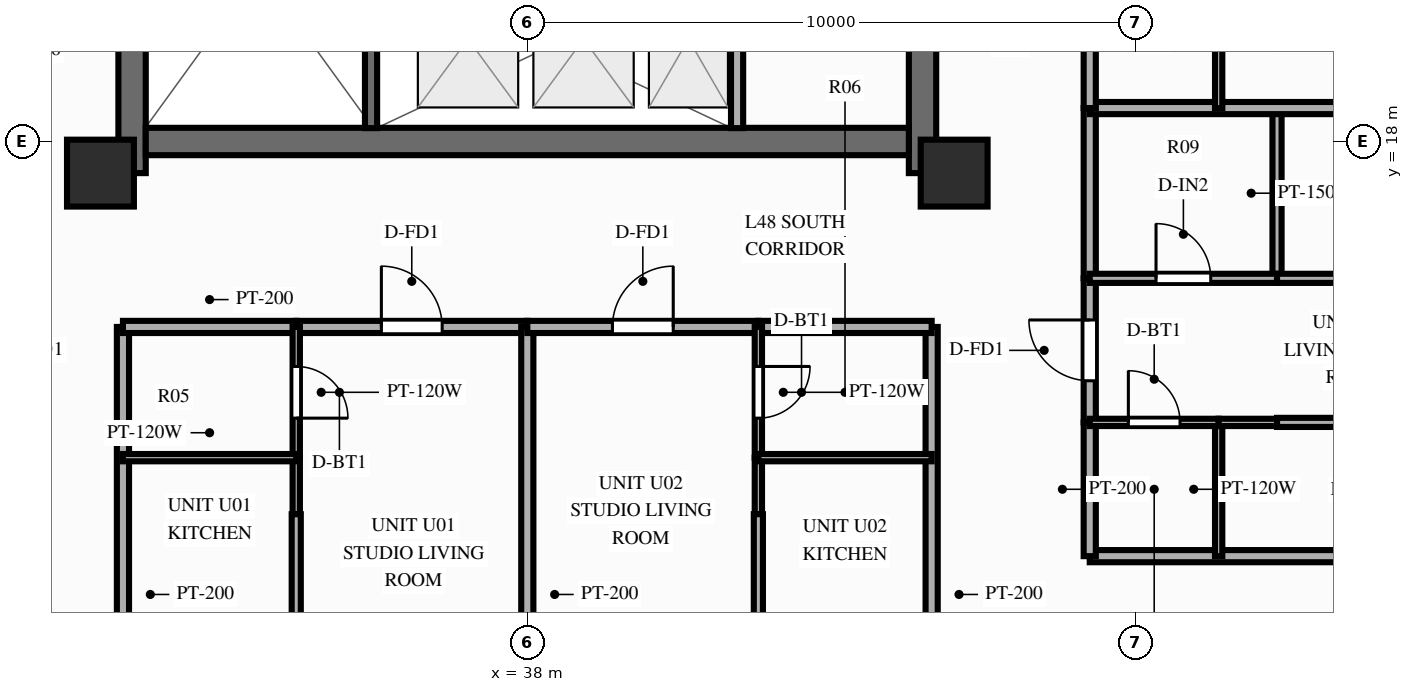
"""IFC4 building model, lengths in metres.
Left out: names, types, materials, properties, quantities, classifications, styles, units other than length and angle.
Written with IfcOpenShell. Run it as: python <this file> out.ifc"""

import sys

from ifc_helpers import new_model, si_unit, direction, frame, frame_2d, origin, origin_2d, place, context, subcontext, project, spatial, rectangle, extrude, source, transform, mapped, element, fill, save


model = new_model("IFC4")
c1 = context("Model", 3, precision=1e-05, world=origin(), true_north=direction((0.0, 1.0)))
c2 = subcontext(c1, "Body", "Model", "MODEL_VIEW")
j1 = project(units=[si_unit("LENGTHUNIT", "METRE"), si_unit("PLANEANGLEUNIT", "RADIAN")], contexts=[c1])
p1 = place(None, origin())
s1 = spatial("IfcSite", under=j1, at=p1, CompositionType="ELEMENT")
p2 = place(p1, origin())
s2 = spatial("IfcBuilding", under=s1, at=p2, CompositionType="ELEMENT")
p3 = place(p2, frame((0.0, 0.0, 152.2)))
s3 = spatial("IfcBuildingStorey", under=s2, at=p3, CompositionType="ELEMENT", Elevation=152.2)
p4 = place(p3, frame((31.5, 17.48, 0.0), z_axis=(0.0, 0.0, 1.0), x_axis=(0.0, 1.0, 0.0)))
e1 = element("IfcWall", 1, at=p4, inside=s3, PredefinedType="SHEAR", context=c2, shape_type="SweptSolid", body=[
    extrude(rectangle(XDim=19.04, YDim=0.45, at=frame_2d((9.52, 0.0))), origin(), (0.0, 0.0, 1.0), 3.9),
])
p5 = place(p4, frame((6.32, 0.0, 0.0)))
e2 = element("IfcOpeningElement", 2, at=p5, cuts=e1, PredefinedType="OPENING", context=c2, shape_type="SweptSolid", body=[
    extrude(rectangle(XDim=1.1, YDim=2.15, at=frame_2d((0.55, 1.075))), frame((0.0, 0.237, 0.0), z_axis=(0.0, -1.0, 0.0), x_axis=(1.0, 0.0, 0.0)), (0.0, 0.0, 1.0), 0.474),
])
p6 = place(p3, frame((44.5, 17.48, 0.0), z_axis=(0.0, 0.0, 1.0), x_axis=(0.0, 1.0, 0.0)))
e3 = element("IfcWall", 3, at=p6, inside=s3, PredefinedType="SHEAR", context=c2, shape_type="SweptSolid", body=[
    extrude(rectangle(XDim=19.04, YDim=0.45, at=frame_2d((9.52, 0.0))), origin(), (0.0, 0.0, 1.0), 3.9),
])
p7 = place(p6, frame((12.67, 0.0, 0.0), z_axis=(0.0, 0.0, 1.0), x_axis=(-1.0, 0.0, 0.0)))
e4 = element("IfcOpeningElement", 4, at=p7, cuts=e3, PredefinedType="OPENING", context=c2, shape_type="SweptSolid", body=[
    extrude(rectangle(XDim=1.1, YDim=2.15, at=frame_2d((0.55, 1.075))), frame((0.0, 0.237, 0.0), z_axis=(0.0, -1.0, 0.0), x_axis=(1.0, 0.0, 0.0)), (0.0, 0.0, 1.0), 0.474),
])
p8 = place(p3, frame((31.725, 18.0, 0.0), z_axis=(0.0, 0.0, 1.0), x_axis=(1.0, 0.0, 0.0)))
e5 = element("IfcWall", 5, at=p8, inside=s3, PredefinedType="SHEAR", context=c2, shape_type="SweptSolid", body=[
    extrude(rectangle(XDim=12.55, YDim=0.45, at=frame_2d((6.275, 0.0))), origin(), (0.0, 0.0, 1.0), 3.9),
])
m1 = source(origin(), c2, "Body", "SweptSolid", [
    extrude(rectangle(XDim=1.1, YDim=1.1, at=origin_2d()), origin(), (0.0, 0.0, 1.0), 3.9),
])
for number, where, z_axis, x_axis in (
    (6, (30.98, 17.48, 0.0), (0.0, 0.0, 1.0), (1.0, 0.0, 0.0)),
    (7, (45.02, 17.48, 0.0), (0.0, 0.0, 1.0), (1.0, 0.0, 0.0)),
):
    element("IfcColumn", number, at=place(p3, frame(where, z_axis=z_axis, x_axis=x_axis)), inside=s3, PredefinedType="COLUMN", context=c2, shape_type="MappedRepresentation", body=[
        mapped(m1, transform((0.0, 0.0, 0.0), scale=1.0)),
    ])
p9 = place(p3, frame((41.45, 18.22, 0.0), z_axis=(0.0, 0.0, 1.0), x_axis=(0.0, 1.0, 0.0)))
e8 = element("IfcWall", 8, at=p9, inside=s3, PredefinedType="PARTITIONING", context=c2, shape_type="SweptSolid", body=[
    extrude(rectangle(XDim=2.86, YDim=0.2, at=frame_2d((1.43, 0.0))), origin(), (0.0, 0.0, 1.0), 3.56),
])
p10 = place(p3, frame((35.43, 18.22, 0.0), z_axis=(0.0, 0.0, 1.0), x_axis=(0.0, 1.0, 0.0)))
e9 = element("IfcWall", 9, at=p10, inside=s3, PredefinedType="SOLIDWALL", context=c2, shape_type="SweptSolid", body=[
    extrude(rectangle(XDim=7.22, YDim=0.2, at=frame_2d((3.61, 0.0))), origin(), (0.0, 0.0, 1.0), 3.69),
])
p11 = place(p10, frame((6.68, 0.0, 0.0), z_axis=(0.0, 0.0, 1.0), x_axis=(-1.0, 0.0, 0.0)))
e10 = element("IfcOpeningElement", 10, at=p11, cuts=e9, PredefinedType="OPENING", context=c2, shape_type="SweptSolid", body=[
    extrude(rectangle(XDim=1.1, YDim=2.15, at=frame_2d((0.55, 1.075))), frame((0.0, 0.112, 0.0), z_axis=(0.0, -1.0, 0.0), x_axis=(1.0, 0.0, 0.0)), (0.0, 0.0, 1.0), 0.224),
])
for number, where, z_axis, x_axis in (
    (11, (31.35, 14.95, 0.0), (0.0, 0.0, 1.0), (0.0, -1.0, 0.0)),
    (12, (44.65, 14.95, 0.0), (0.0, 0.0, 1.0), (0.0, -1.0, 0.0)),
):
    element("IfcWall", number, at=place(p3, frame(where, z_axis=z_axis, x_axis=x_axis)), inside=s3, PredefinedType="PARTITIONING", context=c2, shape_type="SweptSolid", body=[
        extrude(rectangle(XDim=8.8, YDim=0.2, at=frame_2d((4.4, 0.0))), origin(), (0.0, 0.0, 1.0), 2.44),
    ])
p12 = place(p3, frame((31.35, 14.95, 0.0), z_axis=(0.0, 0.0, 1.0), x_axis=(1.0, 0.0, 0.0)))
e13 = element("IfcWall", 13, at=p12, inside=s3, PredefinedType="PARTITIONING", context=c2, shape_type="SweptSolid", body=[
    extrude(rectangle(XDim=2.85, YDim=0.2, at=frame_2d((1.425, 0.0))), origin(), (0.0, 0.0, 1.0), 3.56),
])
p13 = place(p3, frame((34.2, 14.95, 0.0), z_axis=(0.0, 0.0, 1.0), x_axis=(1.0, 0.0, 0.0)))
e14 = element("IfcWall", 14, at=p13, inside=s3, PredefinedType="PARTITIONING", context=c2, shape_type="SweptSolid", body=[
    extrude(rectangle(XDim=3.8, YDim=0.2, at=frame_2d((1.9, 0.0))), origin(), (0.0, 0.0, 1.0), 3.56),
])
p14 = place(p13, frame((1.4, 0.0, 0.0)))
e15 = element("IfcOpeningElement", 15, at=p14, cuts=e14, PredefinedType="OPENING", context=c2, shape_type="SweptSolid", body=[
    extrude(rectangle(XDim=1.0, YDim=2.15, at=frame_2d((0.5, 1.075))), frame((0.0, 0.112, 0.0), z_axis=(0.0, -1.0, 0.0), x_axis=(1.0, 0.0, 0.0)), (0.0, 0.0, 1.0), 0.224),
])
p15 = place(p3, frame((34.2, 14.95, 0.0), z_axis=(0.0, 0.0, 1.0), x_axis=(0.0, -1.0, 0.0)))
e16 = element("IfcWall", 16, at=p15, inside=s3, PredefinedType="PARTITIONING", context=c2, shape_type="SweptSolid", body=[
    extrude(rectangle(XDim=2.15, YDim=0.12, at=frame_2d((1.075, 0.0))), origin(), (0.0, 0.0, 1.0), 3.56),
])
p16 = place(p15, frame((0.65, 0.0, 0.0)))
e17 = element("IfcOpeningElement", 17, at=p16, cuts=e16, PredefinedType="OPENING", context=c2, shape_type="SweptSolid", body=[
    extrude(rectangle(XDim=0.85, YDim=2.05, at=frame_2d((0.425, 1.025))), frame((0.0, 0.072, 0.0), z_axis=(0.0, -1.0, 0.0), x_axis=(1.0, 0.0, 0.0)), (0.0, 0.0, 1.0), 0.144),
])
p17 = place(p3, frame((34.2, 12.8, 0.0), z_axis=(0.0, 0.0, 1.0), x_axis=(0.0, -1.0, 0.0)))
e18 = element("IfcWall", 18, at=p17, inside=s3, PredefinedType="PARTITIONING", context=c2, shape_type="SweptSolid", body=[
    extrude(rectangle(XDim=0.93, YDim=0.12, at=frame_2d((0.465, 0.0))), origin(), (0.0, 0.0, 1.0), 3.56),
])
p18 = place(p3, frame((31.35, 12.8, 0.0), z_axis=(0.0, 0.0, 1.0), x_axis=(1.0, 0.0, 0.0)))
e19 = element("IfcWall", 19, at=p18, inside=s3, PredefinedType="PARTITIONING", context=c2, shape_type="SweptSolid", body=[
    extrude(rectangle(XDim=2.85, YDim=0.12, at=frame_2d((1.425, 0.0))), origin(), (0.0, 0.0, 1.0), 3.56),
])
p19 = place(p3, frame((34.2, 11.87, 0.0), z_axis=(0.0, 0.0, 1.0), x_axis=(0.0, -1.0, 0.0)))
e20 = element("IfcWall", 20, at=p19, inside=s3, PredefinedType="PARTITIONING", context=c2, shape_type="SweptSolid", body=[
    extrude(rectangle(XDim=5.72, YDim=0.15, at=frame_2d((2.86, 0.0))), origin(), (0.0, 0.0, 1.0), 3.56),
])
p20 = place(p19, frame((2.229, 0.0, 0.0)))
e21 = element("IfcOpeningElement", 21, at=p20, cuts=e20, PredefinedType="OPENING", context=c2, shape_type="SweptSolid", body=[
    extrude(rectangle(XDim=0.9, YDim=2.1, at=frame_2d((0.45, 1.05))), frame((0.0, 0.087, 0.0), z_axis=(0.0, -1.0, 0.0), x_axis=(1.0, 0.0, 0.0)), (0.0, 0.0, 1.0), 0.174),
])
p21 = place(p3, frame((38.0, 14.95, 0.0), z_axis=(0.0, 0.0, 1.0), x_axis=(0.0, -1.0, 0.0)))
e22 = element("IfcWall", 22, at=p21, inside=s3, PredefinedType="PARTITIONING", context=c2, shape_type="SweptSolid", body=[
    extrude(rectangle(XDim=8.8, YDim=0.2, at=frame_2d((4.4, 0.0))), origin(), (0.0, 0.0, 1.0), 3.56),
])
p22 = place(p3, frame((38.0, 14.95, 0.0), z_axis=(0.0, 0.0, 1.0), x_axis=(1.0, 0.0, 0.0)))
e23 = element("IfcWall", 23, at=p22, inside=s3, PredefinedType="PARTITIONING", context=c2, shape_type="SweptSolid", body=[
    extrude(rectangle(XDim=3.8, YDim=0.2, at=frame_2d((1.9, 0.0))), origin(), (0.0, 0.0, 1.0), 3.56),
])
p23 = place(p22, frame((1.4, 0.0, 0.0)))
e24 = element("IfcOpeningElement", 24, at=p23, cuts=e23, PredefinedType="OPENING", context=c2, shape_type="SweptSolid", body=[
    extrude(rectangle(XDim=1.0, YDim=2.15, at=frame_2d((0.5, 1.075))), frame((0.0, 0.112, 0.0), z_axis=(0.0, -1.0, 0.0), x_axis=(1.0, 0.0, 0.0)), (0.0, 0.0, 1.0), 0.224),
])
p24 = place(p3, frame((41.8, 14.95, 0.0), z_axis=(0.0, 0.0, 1.0), x_axis=(1.0, 0.0, 0.0)))
e25 = element("IfcWall", 25, at=p24, inside=s3, PredefinedType="PARTITIONING", context=c2, shape_type="SweptSolid", body=[
    extrude(rectangle(XDim=2.85, YDim=0.2, at=frame_2d((1.425, 0.0))), origin(), (0.0, 0.0, 1.0), 3.56),
])
p25 = place(p3, frame((41.8, 14.95, 0.0), z_axis=(0.0, 0.0, 1.0), x_axis=(0.0, -1.0, 0.0)))
e26 = element("IfcWall", 26, at=p25, inside=s3, PredefinedType="PARTITIONING", context=c2, shape_type="SweptSolid", body=[
    extrude(rectangle(XDim=2.15, YDim=0.12, at=frame_2d((1.075, 0.0))), origin(), (0.0, 0.0, 1.0), 3.56),
])
p26 = place(p25, frame((0.65, 0.0, 0.0)))
e27 = element("IfcOpeningElement", 27, at=p26, cuts=e26, PredefinedType="OPENING", context=c2, shape_type="SweptSolid", body=[
    extrude(rectangle(XDim=0.85, YDim=2.05, at=frame_2d((0.425, 1.025))), frame((0.0, 0.072, 0.0), z_axis=(0.0, -1.0, 0.0), x_axis=(1.0, 0.0, 0.0)), (0.0, 0.0, 1.0), 0.144),
])
p27 = place(p3, frame((41.8, 12.8, 0.0), z_axis=(0.0, 0.0, 1.0), x_axis=(0.0, -1.0, 0.0)))
e28 = element("IfcWall", 28, at=p27, inside=s3, PredefinedType="PARTITIONING", context=c2, shape_type="SweptSolid", body=[
    extrude(rectangle(XDim=0.93, YDim=0.12, at=frame_2d((0.465, 0.0))), origin(), (0.0, 0.0, 1.0), 3.56),
])
p28 = place(p3, frame((41.8, 12.8, 0.0), z_axis=(0.0, 0.0, 1.0), x_axis=(1.0, 0.0, 0.0)))
e29 = element("IfcWall", 29, at=p28, inside=s3, PredefinedType="PARTITIONING", context=c2, shape_type="SweptSolid", body=[
    extrude(rectangle(XDim=2.85, YDim=0.12, at=frame_2d((1.425, 0.0))), origin(), (0.0, 0.0, 1.0), 3.56),
])
p29 = place(p3, frame((41.8, 11.87, 0.0), z_axis=(0.0, 0.0, 1.0), x_axis=(0.0, -1.0, 0.0)))
e30 = element("IfcWall", 30, at=p29, inside=s3, PredefinedType="PARTITIONING", context=c2, shape_type="SweptSolid", body=[
    extrude(rectangle(XDim=5.72, YDim=0.15, at=frame_2d((2.86, 0.0))), origin(), (0.0, 0.0, 1.0), 3.56),
])
p30 = place(p29, frame((2.229, 0.0, 0.0)))
e31 = element("IfcOpeningElement", 31, at=p30, cuts=e30, PredefinedType="OPENING", context=c2, shape_type="SweptSolid", body=[
    extrude(rectangle(XDim=0.9, YDim=2.1, at=frame_2d((0.45, 1.05))), frame((0.0, 0.087, 0.0), z_axis=(0.0, -1.0, 0.0), x_axis=(1.0, 0.0, 0.0)), (0.0, 0.0, 1.0), 0.174),
])
p31 = place(p3, frame((47.25, 11.18, 0.0), z_axis=(0.0, 0.0, 1.0), x_axis=(1.0, 0.0, 0.0)))
e32 = element("IfcWall", 32, at=p31, inside=s3, PredefinedType="PARTITIONING", context=c2, shape_type="SweptSolid", body=[
    extrude(rectangle(XDim=12.6, YDim=0.2, at=frame_2d((6.3, 0.0))), origin(), (0.0, 0.0, 1.0), 3.56),
])
p32 = place(p3, frame((47.25, 11.18, 0.0), z_axis=(0.0, 0.0, 1.0), x_axis=(0.0, 1.0, 0.0)))
e33 = element("IfcWall", 33, at=p32, inside=s3, PredefinedType="PARTITIONING", context=c2, shape_type="SweptSolid", body=[
    extrude(rectangle(XDim=2.2, YDim=0.2, at=frame_2d((1.1, 0.0))), origin(), (0.0, 0.0, 1.0), 3.56),
])
p33 = place(p3, frame((47.25, 13.38, 0.0), z_axis=(0.0, 0.0, 1.0), x_axis=(0.0, 1.0, 0.0)))
e34 = element("IfcWall", 34, at=p33, inside=s3, PredefinedType="PARTITIONING", context=c2, shape_type="SweptSolid", body=[
    extrude(rectangle(XDim=2.37, YDim=0.2, at=frame_2d((1.185, 0.0))), origin(), (0.0, 0.0, 1.0), 3.56),
])
p34 = place(p33, frame((0.685, 0.0, 0.0)))
e35 = element("IfcOpeningElement", 35, at=p34, cuts=e34, PredefinedType="OPENING", context=c2, shape_type="SweptSolid", body=[
    extrude(rectangle(XDim=1.0, YDim=2.15, at=frame_2d((0.5, 1.075))), frame((0.0, 0.112, 0.0), z_axis=(0.0, -1.0, 0.0), x_axis=(1.0, 0.0, 0.0)), (0.0, 0.0, 1.0), 0.224),
])
p35 = place(p3, frame((47.25, 15.75, 0.0), z_axis=(0.0, 0.0, 1.0), x_axis=(0.0, 1.0, 0.0)))
e36 = element("IfcWall", 36, at=p35, inside=s3, PredefinedType="PARTITIONING", context=c2, shape_type="SweptSolid", body=[
    extrude(rectangle(XDim=2.801, YDim=0.2, at=frame_2d((1.4, 0.0))), origin(), (0.0, 0.0, 1.0), 3.56),
])
p36 = place(p3, frame((49.37, 11.18, 0.0), z_axis=(0.0, 0.0, 1.0), x_axis=(0.0, 1.0, 0.0)))
e37 = element("IfcWall", 37, at=p36, inside=s3, PredefinedType="PARTITIONING", context=c2, shape_type="SweptSolid", body=[
    extrude(rectangle(XDim=2.2, YDim=0.12, at=frame_2d((1.1, 0.0))), origin(), (0.0, 0.0, 1.0), 3.56),
])
p37 = place(p3, frame((50.33, 15.75, 0.0), z_axis=(0.0, 0.0, 1.0), x_axis=(0.0, 1.0, 0.0)))
e38 = element("IfcWall", 38, at=p37, inside=s3, PredefinedType="PARTITIONING", context=c2, shape_type="SweptSolid", body=[
    extrude(rectangle(XDim=2.801, YDim=0.15, at=frame_2d((1.4, 0.0))), origin(), (0.0, 0.0, 1.0), 3.56),
])
p38 = place(p3, frame((47.25, 13.38, 0.0), z_axis=(0.0, 0.0, 1.0), x_axis=(1.0, 0.0, 0.0)))
e39 = element("IfcWall", 39, at=p38, inside=s3, PredefinedType="PARTITIONING", context=c2, shape_type="SweptSolid", body=[
    extrude(rectangle(XDim=2.12, YDim=0.12, at=frame_2d((1.06, 0.0))), origin(), (0.0, 0.0, 1.0), 3.56),
])
p39 = place(p38, frame((0.635, 0.0, 0.0)))
e40 = element("IfcOpeningElement", 40, at=p39, cuts=e39, PredefinedType="OPENING", context=c2, shape_type="SweptSolid", body=[
    extrude(rectangle(XDim=0.85, YDim=2.05, at=frame_2d((0.425, 1.025))), frame((0.0, 0.072, 0.0), z_axis=(0.0, -1.0, 0.0), x_axis=(1.0, 0.0, 0.0)), (0.0, 0.0, 1.0), 0.144),
])
p40 = place(p3, frame((49.37, 13.38, 0.0), z_axis=(0.0, 0.0, 1.0), x_axis=(1.0, 0.0, 0.0)))
e41 = element("IfcWall", 41, at=p40, inside=s3, PredefinedType="PARTITIONING", context=c2, shape_type="SweptSolid", body=[
    extrude(rectangle(XDim=0.96, YDim=0.12, at=frame_2d((0.48, 0.0))), origin(), (0.0, 0.0, 1.0), 3.56),
])
p41 = place(p3, frame((50.33, 13.38, 0.0), z_axis=(0.0, 0.0, 1.0), x_axis=(1.0, 0.0, 0.0)))
e42 = element("IfcWall", 42, at=p41, inside=s3, PredefinedType="PARTITIONING", context=c2, shape_type="SweptSolid", body=[
    extrude(rectangle(XDim=9.52, YDim=0.15, at=frame_2d((4.76, 0.0))), origin(), (0.0, 0.0, 1.0), 3.56),
])
p42 = place(p41, frame((3.971, 0.0, 0.0)))
e43 = element("IfcOpeningElement", 43, at=p42, cuts=e42, PredefinedType="OPENING", context=c2, shape_type="SweptSolid", body=[
    extrude(rectangle(XDim=0.9, YDim=2.1, at=frame_2d((0.45, 1.05))), frame((0.0, 0.087, 0.0), z_axis=(0.0, -1.0, 0.0), x_axis=(1.0, 0.0, 0.0)), (0.0, 0.0, 1.0), 0.174),
])
p43 = place(p3, frame((47.25, 15.75, 0.0), z_axis=(0.0, 0.0, 1.0), x_axis=(1.0, 0.0, 0.0)))
e44 = element("IfcWall", 44, at=p43, inside=s3, PredefinedType="PARTITIONING", context=c2, shape_type="SweptSolid", body=[
    extrude(rectangle(XDim=3.08, YDim=0.15, at=frame_2d((1.54, 0.0))), origin(), (0.0, 0.0, 1.0), 3.56),
])
p44 = place(p43, frame((1.09, 0.0, 0.0)))
e45 = element("IfcOpeningElement", 45, at=p44, cuts=e44, PredefinedType="OPENING", context=c2, shape_type="SweptSolid", body=[
    extrude(rectangle(XDim=0.9, YDim=2.1, at=frame_2d((0.45, 1.05))), frame((0.0, 0.087, 0.0), z_axis=(0.0, -1.0, 0.0), x_axis=(1.0, 0.0, 0.0)), (0.0, 0.0, 1.0), 0.174),
])
p45 = place(p3, frame((50.33, 15.75, 0.0), z_axis=(0.0, 0.0, 1.0), x_axis=(1.0, 0.0, 0.0)))
e46 = element("IfcWall", 46, at=p45, inside=s3, PredefinedType="PARTITIONING", context=c2, shape_type="SweptSolid", body=[
    extrude(rectangle(XDim=9.52, YDim=0.15, at=frame_2d((4.76, 0.0))), origin(), (0.0, 0.0, 1.0), 3.56),
])
p46 = place(p45, frame((3.971, 0.0, 0.0)))
e47 = element("IfcOpeningElement", 47, at=p46, cuts=e46, PredefinedType="OPENING", context=c2, shape_type="SweptSolid", body=[
    extrude(rectangle(XDim=0.9, YDim=2.1, at=frame_2d((0.45, 1.05))), frame((0.0, 0.087, 0.0), z_axis=(0.0, -1.0, 0.0), x_axis=(1.0, 0.0, 0.0)), (0.0, 0.0, 1.0), 0.174),
])
p47 = place(p3, frame((47.25, 18.55, 0.0), z_axis=(0.0, 0.0, 1.0), x_axis=(1.0, 0.0, 0.0)))
e48 = element("IfcWall", 48, at=p47, inside=s3, PredefinedType="PARTITIONING", context=c2, shape_type="SweptSolid", body=[
    extrude(rectangle(XDim=12.6, YDim=0.2, at=frame_2d((6.3, 0.0))), origin(), (0.0, 0.0, 1.0), 3.56),
])
p48 = place(p3, frame((47.25, 18.55, 0.0), z_axis=(0.0, 0.0, 1.0), x_axis=(0.0, 1.0, 0.0)))
e49 = element("IfcWall", 49, at=p48, inside=s3, PredefinedType="PARTITIONING", context=c2, shape_type="SweptSolid", body=[
    extrude(rectangle(XDim=2.2, YDim=0.2, at=frame_2d((1.1, 0.0))), origin(), (0.0, 0.0, 1.0), 3.56),
])
p49 = place(p3, frame((49.37, 18.55, 0.0), z_axis=(0.0, 0.0, 1.0), x_axis=(0.0, 1.0, 0.0)))
e50 = element("IfcWall", 50, at=p49, inside=s3, PredefinedType="PARTITIONING", context=c2, shape_type="SweptSolid", body=[
    extrude(rectangle(XDim=2.2, YDim=0.12, at=frame_2d((1.1, 0.0))), origin(), (0.0, 0.0, 1.0), 3.56),
])
m2 = source(origin(), c2, "Body", "SweptSolid", [
    extrude(rectangle(XDim=1.0, YDim=2.15, at=frame_2d((0.5, 1.075))), frame((0.0, 0.025, 0.0), z_axis=(0.0, -1.0, 0.0), x_axis=(1.0, 0.0, 0.0)), (0.0, 0.0, 1.0), 0.05),
])
p50 = place(p14, origin())
e51 = element("IfcDoor", 51, at=p50, inside=s3, OperationType="SINGLE_SWING_LEFT", PredefinedType="DOOR", context=c2, shape_type="MappedRepresentation", body=[
    mapped(m2, transform((0.0, 0.0, 0.0), scale=1.0)),
])
fill(e15, e51)
m3 = source(origin(), c2, "Body", "SweptSolid", [
    extrude(rectangle(XDim=0.85, YDim=2.05, at=frame_2d((0.425, 1.025))), frame((0.0, 0.025, 0.0), z_axis=(0.0, -1.0, 0.0), x_axis=(1.0, 0.0, 0.0)), (0.0, 0.0, 1.0), 0.05),
])
p51 = place(p16, origin())
e52 = element("IfcDoor", 52, at=p51, inside=s3, OperationType="SINGLE_SWING_RIGHT", PredefinedType="DOOR", context=c2, shape_type="MappedRepresentation", body=[
    mapped(m3, transform((0.0, 0.0, 0.0), scale=1.0)),
])
fill(e17, e52)
p52 = place(p23, origin())
e53 = element("IfcDoor", 53, at=p52, inside=s3, OperationType="SINGLE_SWING_RIGHT", PredefinedType="DOOR", context=c2, shape_type="MappedRepresentation", body=[
    mapped(m2, transform((0.0, 0.0, 0.0), scale=1.0)),
])
fill(e24, e53)
p53 = place(p26, origin())
e54 = element("IfcDoor", 54, at=p53, inside=s3, OperationType="SINGLE_SWING_LEFT", PredefinedType="DOOR", context=c2, shape_type="MappedRepresentation", body=[
    mapped(m3, transform((0.0, 0.0, 0.0), scale=1.0)),
])
fill(e27, e54)
p54 = place(p34, origin())
e55 = element("IfcDoor", 55, at=p54, inside=s3, OperationType="SINGLE_SWING_RIGHT", PredefinedType="DOOR", context=c2, shape_type="MappedRepresentation", body=[
    mapped(m2, transform((0.0, 0.0, 0.0), scale=1.0)),
])
fill(e35, e55)
p55 = place(p39, origin())
e56 = element("IfcDoor", 56, at=p55, inside=s3, OperationType="SINGLE_SWING_LEFT", PredefinedType="DOOR", context=c2, shape_type="MappedRepresentation", body=[
    mapped(m3, transform((0.0, 0.0, 0.0), scale=1.0)),
])
fill(e40, e56)
m4 = source(origin(), c2, "Body", "SweptSolid", [
    extrude(rectangle(XDim=0.9, YDim=2.1, at=frame_2d((0.45, 1.05))), frame((0.0, 0.025, 0.0), z_axis=(0.0, -1.0, 0.0), x_axis=(1.0, 0.0, 0.0)), (0.0, 0.0, 1.0), 0.05),
])
p56 = place(p44, origin())
e57 = element("IfcDoor", 57, at=p56, inside=s3, OperationType="SINGLE_SWING_LEFT", PredefinedType="DOOR", context=c2, shape_type="MappedRepresentation", body=[
    mapped(m4, transform((0.0, 0.0, 0.0), scale=1.0)),
])
fill(e45, e57)
save(model, sys.argv[1])
